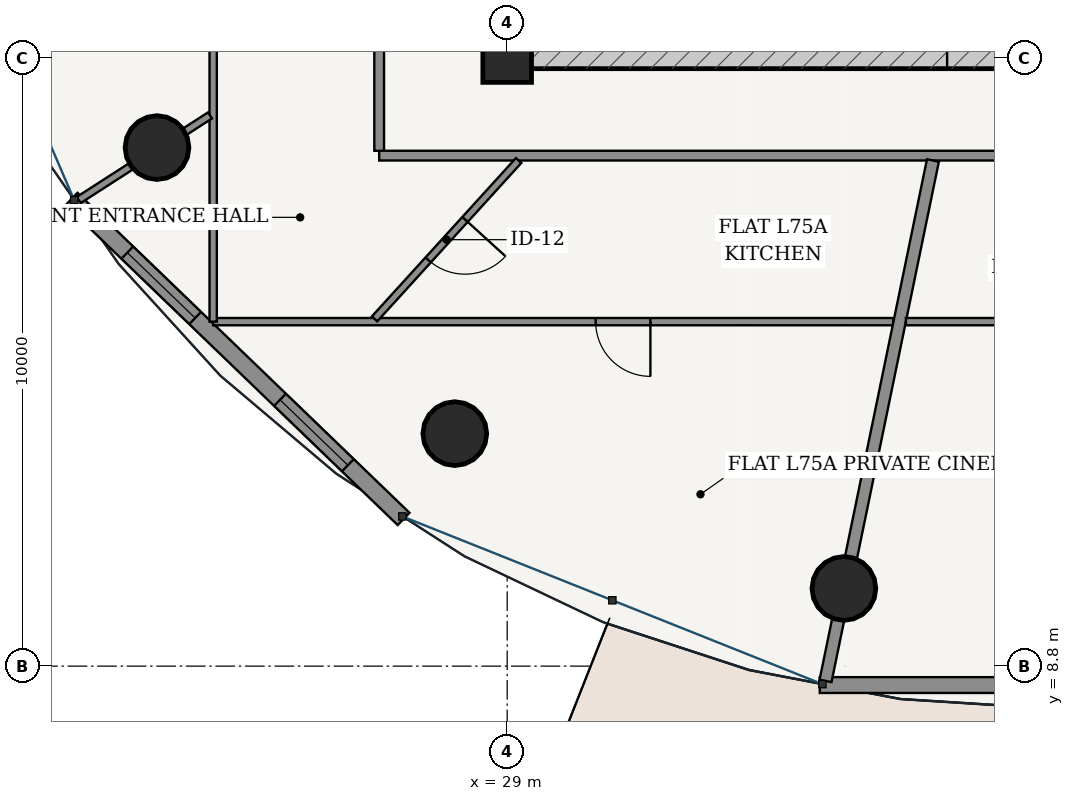
"""IFC4 building model, lengths in metres.
Left out: names, types, materials, properties, quantities, classifications, styles, units other than length and angle.
Written with IfcOpenShell. Run it as: python <this file> out.ifc"""

import sys

from ifc_helpers import new_model, si_unit, direction, frame, frame_2d, origin, origin_2d, place, context, subcontext, project, spatial, rectangle, hollow_circle, extrude, source, transform, mapped, element, fill, save


model = new_model("IFC4")
c1 = context("Model", 3, precision=1e-05, world=origin(), true_north=direction((-0.2419218956, 0.970295726276)))
c2 = subcontext(c1, "Body", "Model", "MODEL_VIEW")
j1 = project(units=[si_unit("LENGTHUNIT", "METRE"), si_unit("PLANEANGLEUNIT", "RADIAN")], contexts=[c1])
p1 = place(None, origin())
s1 = spatial("IfcSite", under=j1, at=p1, CompositionType="ELEMENT")
p2 = place(p1, origin())
s2 = spatial("IfcBuilding", under=s1, at=p2, CompositionType="ELEMENT")
p3 = place(p2, frame((0.0, 0.0, 285.7)))
s3 = spatial("IfcBuildingStorey", under=s2, at=p3, CompositionType="ELEMENT", Elevation=285.7)
p4 = place(p3, frame((29.0, 18.8, 0.0), z_axis=(0.0, 0.0, 1.0), x_axis=(1.0, 0.0, 0.0)))
e1 = element("IfcColumn", 1, at=p4, inside=s3, PredefinedType="COLUMN", context=c2, shape_type="SweptSolid", body=[
    extrude(rectangle(XDim=0.8, YDim=0.8, at=origin_2d()), origin(), (0.0, 0.0, 1.0), 3.75),
])
p5 = place(p3, frame((28.825, 18.9, 0.0), z_axis=(0.0, 0.0, 1.0), x_axis=(1.0, 0.0, 0.0)))
e2 = element("IfcWall", 2, at=p5, inside=s3, PredefinedType="SHEAR", context=c2, shape_type="SweptSolid", body=[
    extrude(rectangle(XDim=18.35, YDim=0.55, at=frame_2d((9.175, 0.0))), origin(), (0.0, 0.0, 1.0), 3.49),
])
p6 = place(p5, frame((7.41, 0.0, 0.0)))
e3 = element("IfcOpeningElement", 3, at=p6, cuts=e2, PredefinedType="OPENING", context=c2, shape_type="SweptSolid", body=[
    extrude(rectangle(XDim=0.85, YDim=2.1, at=frame_2d((0.425, 1.05))), frame((0.0, 0.285, 0.0), z_axis=(0.0, -1.0, 0.0), x_axis=(1.0, 0.0, 0.0)), (0.0, 0.0, 1.0), 0.57),
])
p7 = place(p5, frame((10.49, 0.0, 0.0)))
e4 = element("IfcOpeningElement", 4, at=p7, cuts=e2, PredefinedType="OPENING", context=c2, shape_type="SweptSolid", body=[
    extrude(rectangle(XDim=0.85, YDim=2.1, at=frame_2d((0.425, 1.05))), frame((0.0, 0.285, 0.0), z_axis=(0.0, -1.0, 0.0), x_axis=(1.0, 0.0, 0.0)), (0.0, 0.0, 1.0), 0.57),
])
for number, where, z_axis, x_axis in (
    (5, (23.241, 17.328, 0.0), (0.0, 0.0, 1.0), (1.0, 0.0, 0.0)),
    (6, (28.139, 12.624, 0.0), (0.0, 0.0, 1.0), (1.0, 0.0, 0.0)),
    (7, (34.537, 10.078, 0.0), (0.0, 0.0, 1.0), (1.0, 0.0, 0.0)),
):
    element("IfcColumn", number, at=place(p3, frame(where, z_axis=z_axis, x_axis=x_axis)), inside=s3, PredefinedType="COLUMN", context=c2, shape_type="SweptSolid", body=[
        extrude(hollow_circle(Radius=0.525, WallThickness=0.035, at=origin_2d()), origin(), (0.0, 0.0, 1.0), 3.75),
    ])
p8 = place(p3, frame((21.837, 16.483, 0.0), z_axis=(0.0, 0.0, 1.0), x_axis=(0.719995397366, -0.69397883813, 0.0)))
e8 = element("IfcWall", 8, at=p8, inside=s3, PredefinedType="SOLIDWALL", context=c2, shape_type="SweptSolid", body=[
    extrude(rectangle(XDim=7.582, YDim=0.28, at=frame_2d((3.791, 0.0))), origin(), (0.0, 0.0, 1.0), 3.49),
])
p9 = place(p8, frame((1.272, 0.0, 0.85)))
e9 = element("IfcOpeningElement", 9, at=p9, cuts=e8, PredefinedType="OPENING", context=c2, shape_type="SweptSolid", body=[
    extrude(rectangle(XDim=1.55, YDim=1.95, at=frame_2d((0.775, 0.975))), frame((0.0, 0.15, 0.0), z_axis=(0.0, -1.0, 0.0), x_axis=(1.0, 0.0, 0.0)), (0.0, 0.0, 1.0), 0.3),
])
p10 = place(p8, frame((4.76, 0.0, 0.85)))
e10 = element("IfcOpeningElement", 10, at=p10, cuts=e8, PredefinedType="OPENING", context=c2, shape_type="SweptSolid", body=[
    extrude(rectangle(XDim=1.55, YDim=1.95, at=frame_2d((0.775, 0.975))), frame((0.0, 0.15, 0.0), z_axis=(0.0, -1.0, 0.0), x_axis=(1.0, 0.0, 0.0)), (0.0, 0.0, 1.0), 0.3),
])
p11 = place(p3, frame((34.141, 8.489, 0.0), z_axis=(0.0, 0.0, 1.0), x_axis=(1.0, 0.0, 0.0)))
e11 = element("IfcWall", 11, at=p11, inside=s3, PredefinedType="SOLIDWALL", context=c2, shape_type="SweptSolid", body=[
    extrude(rectangle(XDim=7.718, YDim=0.26, at=frame_2d((3.859, 0.0))), origin(), (0.0, 0.0, 1.0), 3.49),
])
p12 = place(p11, frame((3.184, 0.0, 0.0)))
e12 = element("IfcOpeningElement", 12, at=p12, cuts=e11, PredefinedType="OPENING", context=c2, shape_type="SweptSolid", body=[
    extrude(rectangle(XDim=1.35, YDim=2.2, at=frame_2d((0.675, 1.1))), frame((0.0, 0.14, 0.0), z_axis=(0.0, -1.0, 0.0), x_axis=(1.0, 0.0, 0.0)), (0.0, 0.0, 1.0), 0.28),
])
p13 = place(p3, frame((26.895, 17.195, 0.0), z_axis=(0.0, 0.0, 1.0), x_axis=(1.0, 0.0, 0.0)))
e13 = element("IfcWall", 13, at=p13, inside=s3, PredefinedType="PARTITIONING", context=c2, shape_type="SweptSolid", body=[
    extrude(rectangle(XDim=22.21, YDim=0.16, at=frame_2d((11.105, 0.0))), origin(), (0.0, 0.0, 1.0), 3.015),
])
p14 = place(p13, frame((17.365, 0.0, 0.0)))
e14 = element("IfcOpeningElement", 14, at=p14, cuts=e13, PredefinedType="OPENING", context=c2, shape_type="SweptSolid", body=[
    extrude(rectangle(XDim=0.98, YDim=2.2, at=frame_2d((0.49, 1.1))), frame((0.0, 0.09, 0.0), z_axis=(0.0, -1.0, 0.0), x_axis=(1.0, 0.0, 0.0)), (0.0, 0.0, 1.0), 0.18),
])
p15 = place(p3, frame((26.895, 17.275, 0.0), z_axis=(0.0, 0.0, 1.0), x_axis=(0.0, 1.0, 0.0)))
e15 = element("IfcWall", 15, at=p15, inside=s3, PredefinedType="PARTITIONING", context=c2, shape_type="SweptSolid", body=[
    extrude(rectangle(XDim=13.925, YDim=0.16, at=frame_2d((6.962, 0.0))), origin(), (0.0, 0.0, 1.0), 3.015),
])
p16 = place(p15, frame((2.321, 0.0, 0.0)))
e16 = element("IfcOpeningElement", 16, at=p16, cuts=e15, PredefinedType="OPENING", context=c2, shape_type="SweptSolid", body=[
    extrude(rectangle(XDim=0.98, YDim=2.2, at=frame_2d((0.49, 1.1))), frame((0.0, 0.09, 0.0), z_axis=(0.0, -1.0, 0.0), x_axis=(1.0, 0.0, 0.0)), (0.0, 0.0, 1.0), 0.18),
])
p17 = place(p3, frame((35.353, 14.465, 0.0), z_axis=(0.0, 0.0, 1.0), x_axis=(-1.0, 0.0, 0.0)))
e17 = element("IfcWall", 17, at=p17, inside=s3, PredefinedType="PARTITIONING", context=c2, shape_type="SweptSolid", body=[
    extrude(rectangle(XDim=11.188, YDim=0.12, at=frame_2d((5.594, 0.0))), origin(), (0.0, 0.0, 1.0), 3.015),
])
p18 = place(p17, frame((3.997, 0.0, 0.0)))
e18 = element("IfcOpeningElement", 18, at=p18, cuts=e17, PredefinedType="OPENING", context=c2, shape_type="SweptSolid", body=[
    extrude(rectangle(XDim=0.9, YDim=2.15, at=frame_2d((0.45, 1.075))), frame((0.0, 0.07, 0.0), z_axis=(0.0, -1.0, 0.0), x_axis=(1.0, 0.0, 0.0)), (0.0, 0.0, 1.0), 0.14),
])
p19 = place(p3, frame((24.165, 14.465, 0.0), z_axis=(0.0, 0.0, 1.0), x_axis=(0.0, 1.0, 0.0)))
e19 = element("IfcWall", 19, at=p19, inside=s3, PredefinedType="PARTITIONING", context=c2, shape_type="SweptSolid", body=[
    extrude(rectangle(XDim=19.545, YDim=0.12, at=frame_2d((9.772, 0.0))), origin(), (0.0, 0.0, 1.0), 3.015),
])
p20 = place(p19, frame((4.875, 0.0, 0.0)))
e20 = element("IfcOpeningElement", 20, at=p20, cuts=e19, PredefinedType="OPENING", context=c2, shape_type="SweptSolid", body=[
    extrude(rectangle(XDim=0.9, YDim=2.15, at=frame_2d((0.45, 1.075))), frame((0.0, 0.07, 0.0), z_axis=(0.0, -1.0, 0.0), x_axis=(1.0, 0.0, 0.0)), (0.0, 0.0, 1.0), 0.14),
])
p21 = place(p19, frame((16.61, 0.0, 0.0)))
e21 = element("IfcOpeningElement", 21, at=p21, cuts=e19, PredefinedType="OPENING", context=c2, shape_type="SweptSolid", body=[
    extrude(rectangle(XDim=0.9, YDim=2.15, at=frame_2d((0.45, 1.075))), frame((0.0, 0.07, 0.0), z_axis=(0.0, -1.0, 0.0), x_axis=(1.0, 0.0, 0.0)), (0.0, 0.0, 1.0), 0.14),
])
p22 = place(p3, frame((24.113, 17.856, 0.0), z_axis=(0.0, 0.0, 1.0), x_axis=(-0.840708587197, -0.54148783127, 0.0)))
e22 = element("IfcWall", 22, at=p22, inside=s3, PredefinedType="PARTITIONING", context=c2, shape_type="SweptSolid", body=[
    extrude(rectangle(XDim=2.568, YDim=0.12, at=frame_2d((1.284, 0.0))), origin(), (0.0, 0.0, 1.0), 3.015),
])
p23 = place(p3, frame((29.188, 17.115, 0.0), z_axis=(0.0, 0.0, 1.0), x_axis=(-0.67292817107, -0.739707831904, 0.0)))
e23 = element("IfcWall", 23, at=p23, inside=s3, PredefinedType="PARTITIONING", context=c2, shape_type="SweptSolid", body=[
    extrude(rectangle(XDim=3.521, YDim=0.12, at=frame_2d((1.76, 0.0))), origin(), (0.0, 0.0, 1.0), 3.015),
])
p24 = place(p23, frame((1.31, 0.0, 0.0)))
e24 = element("IfcOpeningElement", 24, at=p24, cuts=e23, PredefinedType="OPENING", context=c2, shape_type="SweptSolid", body=[
    extrude(rectangle(XDim=0.9, YDim=2.15, at=frame_2d((0.45, 1.075))), frame((0.0, 0.07, 0.0), z_axis=(0.0, -1.0, 0.0), x_axis=(1.0, 0.0, 0.0)), (0.0, 0.0, 1.0), 0.14),
])
p25 = place(p3, frame((36.001, 17.115, 0.0), z_axis=(0.0, 0.0, 1.0), x_axis=(-0.202108543081, -0.979363128167, 0.0)))
e25 = element("IfcWall", 25, at=p25, inside=s3, PredefinedType="PARTITIONING", context=c2, shape_type="SweptSolid", body=[
    extrude(rectangle(XDim=8.739, YDim=0.2, at=frame_2d((4.369, 0.0))), origin(), (0.0, 0.0, 1.0), 3.015),
])
p26 = place(p3, frame((51.835, 14.465, 0.0), z_axis=(0.0, 0.0, 1.0), x_axis=(-1.0, 0.0, 0.0)))
e26 = element("IfcWall", 26, at=p26, inside=s3, PredefinedType="PARTITIONING", context=c2, shape_type="SweptSolid", body=[
    extrude(rectangle(XDim=16.278, YDim=0.12, at=frame_2d((8.139, 0.0))), origin(), (0.0, 0.0, 1.0), 3.015),
])
p27 = place(p26, frame((4.996, 0.0, 0.0)))
e27 = element("IfcOpeningElement", 27, at=p27, cuts=e26, PredefinedType="OPENING", context=c2, shape_type="SweptSolid", body=[
    extrude(rectangle(XDim=0.9, YDim=2.15, at=frame_2d((0.45, 1.075))), frame((0.0, 0.07, 0.0), z_axis=(0.0, -1.0, 0.0), x_axis=(1.0, 0.0, 0.0)), (0.0, 0.0, 1.0), 0.14),
])
m1 = source(origin(), c2, "Body", "SweptSolid", [
    extrude(rectangle(XDim=1.55, YDim=1.95, at=frame_2d((0.775, 0.975))), frame((0.0, 0.03, 0.0), z_axis=(0.0, -1.0, 0.0), x_axis=(1.0, 0.0, 0.0)), (0.0, 0.0, 1.0), 0.06),
])
p28 = place(p9, origin())
e28 = element("IfcWindow", 28, at=p28, inside=s3, PartitioningType="SINGLE_PANEL", PredefinedType="WINDOW", context=c2, shape_type="MappedRepresentation", body=[
    mapped(m1, transform((0.0, 0.0, 0.0), scale=1.0)),
])
fill(e9, e28)
p29 = place(p10, origin())
e29 = element("IfcWindow", 29, at=p29, inside=s3, PartitioningType="SINGLE_PANEL", PredefinedType="WINDOW", context=c2, shape_type="MappedRepresentation", body=[
    mapped(m1, transform((0.0, 0.0, 0.0), scale=1.0)),
])
fill(e10, e29)
m2 = source(origin(), c2, "Body", "SweptSolid", [
    extrude(rectangle(XDim=0.85, YDim=2.1, at=frame_2d((0.425, 1.05))), frame((0.0, 0.025, 0.0), z_axis=(0.0, -1.0, 0.0), x_axis=(1.0, 0.0, 0.0)), (0.0, 0.0, 1.0), 0.05),
])
p30 = place(p6, origin())
e30 = element("IfcDoor", 30, at=p30, inside=s3, OperationType="SINGLE_SWING_RIGHT", PredefinedType="DOOR", context=c2, shape_type="MappedRepresentation", body=[
    mapped(m2, transform((0.0, 0.0, 0.0), scale=1.0)),
])
fill(e3, e30)
m3 = source(origin(), c2, "Body", "SweptSolid", [
    extrude(rectangle(XDim=0.9, YDim=2.15, at=frame_2d((0.45, 1.075))), frame((0.0, 0.025, 0.0), z_axis=(0.0, -1.0, 0.0), x_axis=(1.0, 0.0, 0.0)), (0.0, 0.0, 1.0), 0.05),
])
p31 = place(p24, origin())
e31 = element("IfcDoor", 31, at=p31, inside=s3, OperationType="SINGLE_SWING_LEFT", PredefinedType="DOOR", context=c2, shape_type="MappedRepresentation", body=[
    mapped(m3, transform((0.0, 0.0, 0.0), scale=1.0)),
])
fill(e24, e31)
p32 = place(p18, origin())
e32 = element("IfcDoor", 32, at=p32, inside=s3, OperationType="SINGLE_SWING_LEFT", PredefinedType="DOOR", context=c2, shape_type="MappedRepresentation", body=[
    mapped(m3, transform((0.0, 0.0, 0.0), scale=1.0)),
])
fill(e18, e32)
save(model, sys.argv[1])
